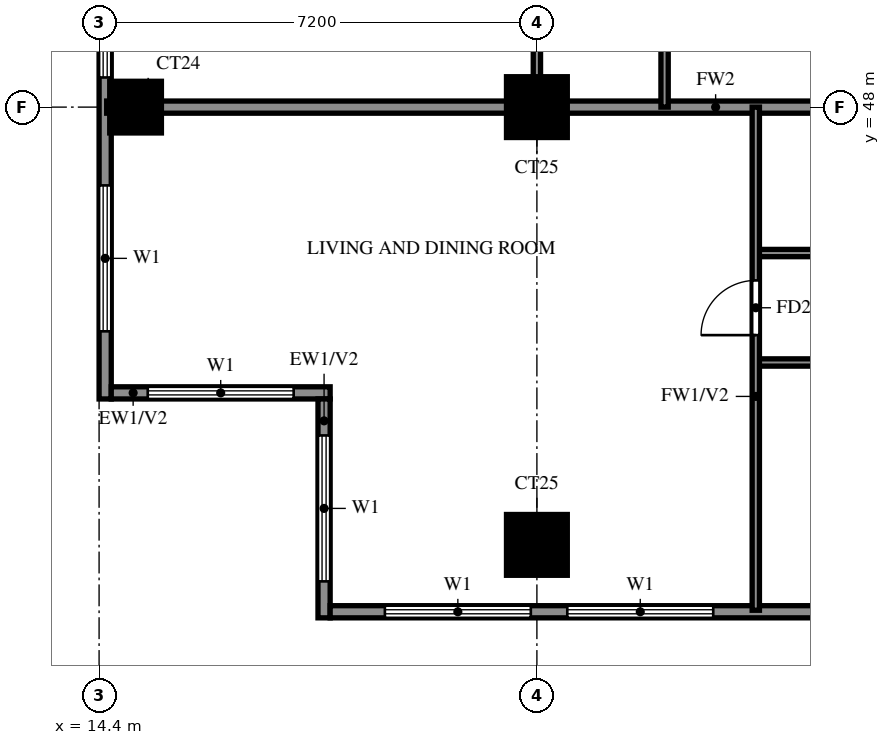
"""IFC4 building model, lengths in metres.
Left out: names, types, materials, properties, quantities, classifications, styles, units other than length and angle.
Written with IfcOpenShell. Run it as: python <this file> out.ifc"""

import sys

from ifc_helpers import new_model, si_unit, direction, frame, frame_2d, origin, origin_2d, place, context, subcontext, project, spatial, rectangle, extrude, source, transform, mapped, element, fill, save


model = new_model("IFC4")
c1 = context("Model", 3, precision=1e-05, world=origin(), true_north=direction((0.0, 1.0)))
c2 = subcontext(c1, "Body", "Model", "MODEL_VIEW")
j1 = project(units=[si_unit("LENGTHUNIT", "METRE"), si_unit("PLANEANGLEUNIT", "RADIAN")], contexts=[c1])
p1 = place(None, origin())
s1 = spatial("IfcSite", under=j1, at=p1, CompositionType="ELEMENT")
p2 = place(p1, origin())
s2 = spatial("IfcBuilding", under=s1, at=p2, CompositionType="ELEMENT")
p3 = place(p2, frame((0.0, 0.0, 150.0)))
s3 = spatial("IfcBuildingStorey", under=s2, at=p3, CompositionType="ELEMENT", Elevation=150.0)
m1 = source(origin(), c2, "Body", "SweptSolid", [
    extrude(rectangle(XDim=1.0, YDim=1.0, at=origin_2d()), origin(), (0.0, 0.0, 1.0), 3.2),
])
p4 = place(p3, frame((21.6, 40.8, 0.0), z_axis=(0.0, 0.0, 1.0), x_axis=(1.0, 0.0, 0.0)))
e1 = element("IfcColumn", 1, at=p4, inside=s3, PredefinedType="COLUMN", context=c2, shape_type="MappedRepresentation", body=[
    mapped(m1, transform((0.0, 0.0, 0.0))),
])
m2 = source(origin(), c2, "Body", "SweptSolid", [
    extrude(rectangle(XDim=0.85, YDim=0.85, at=origin_2d()), origin(), (0.0, 0.0, 1.0), 3.2),
])
p5 = place(p3, frame((15.0, 48.0, 0.0), z_axis=(0.0, 0.0, 1.0), x_axis=(1.0, 0.0, 0.0)))
e2 = element("IfcColumn", 2, at=p5, inside=s3, PredefinedType="COLUMN", context=c2, shape_type="MappedRepresentation", body=[
    mapped(m2, transform((0.0, 0.0, 0.0))),
])
p6 = place(p3, frame((21.6, 48.0, 0.0), z_axis=(0.0, 0.0, 1.0), x_axis=(1.0, 0.0, 0.0)))
e3 = element("IfcColumn", 3, at=p6, inside=s3, PredefinedType="COLUMN", context=c2, shape_type="MappedRepresentation", body=[
    mapped(m1, transform((0.0, 0.0, 0.0))),
])
p7 = place(p3, frame((14.5, 76.6, 0.0), z_axis=(0.0, 0.0, 1.0), x_axis=(0.0, -1.0, 0.0)))
e4 = element("IfcWall", 4, at=p7, inside=s3, PredefinedType="SOLIDWALL", context=c2, shape_type="SweptSolid", body=[
    extrude(rectangle(XDim=33.4, YDim=0.2, at=frame_2d((16.7, 0.0))), origin(), (0.0, 0.0, 1.0), 3.2),
])
p8 = place(p7, frame((7.9, 0.0, 0.0)))
e5 = element("IfcOpeningElement", 5, at=p8, cuts=e4, PredefinedType="OPENING", context=c2, shape_type="SweptSolid", body=[
    extrude(rectangle(XDim=1.8, YDim=2.4, at=frame_2d((0.9, 1.2))), frame((0.0, 0.11, 0.0), z_axis=(0.0, -1.0, 0.0), x_axis=(1.0, 0.0, 0.0)), (0.0, 0.0, 1.0), 0.22),
])
p9 = place(p7, frame((22.3, 0.0, 0.0)))
e6 = element("IfcOpeningElement", 6, at=p9, cuts=e4, PredefinedType="OPENING", context=c2, shape_type="SweptSolid", body=[
    extrude(rectangle(XDim=1.8, YDim=2.4, at=frame_2d((0.9, 1.2))), frame((0.0, 0.11, 0.0), z_axis=(0.0, -1.0, 0.0), x_axis=(1.0, 0.0, 0.0)), (0.0, 0.0, 1.0), 0.22),
])
p10 = place(p7, frame((29.887, 0.0, 0.6)))
e7 = element("IfcOpeningElement", 7, at=p10, cuts=e4, PredefinedType="OPENING", context=c2, shape_type="SweptSolid", body=[
    extrude(rectangle(XDim=2.4, YDim=2.4, at=frame_2d((1.2, 1.2))), frame((0.0, 0.11, 0.0), z_axis=(0.0, -1.0, 0.0), x_axis=(1.0, 0.0, 0.0)), (0.0, 0.0, 1.0), 0.22),
])
p11 = place(p7, frame((24.55, 0.0, 0.6)))
e8 = element("IfcOpeningElement", 8, at=p11, cuts=e4, PredefinedType="OPENING", context=c2, shape_type="SweptSolid", body=[
    extrude(rectangle(XDim=0.9, YDim=2.4, at=frame_2d((0.45, 1.2))), frame((0.0, 0.11, 0.0), z_axis=(0.0, -1.0, 0.0), x_axis=(1.0, 0.0, 0.0)), (0.0, 0.0, 1.0), 0.22),
])
p12 = place(p7, frame((26.312, 0.0, 0.6)))
e9 = element("IfcOpeningElement", 9, at=p12, cuts=e4, PredefinedType="OPENING", context=c2, shape_type="SweptSolid", body=[
    extrude(rectangle(XDim=1.8, YDim=2.4, at=frame_2d((0.9, 1.2))), frame((0.0, 0.11, 0.0), z_axis=(0.0, -1.0, 0.0), x_axis=(1.0, 0.0, 0.0)), (0.0, 0.0, 1.0), 0.22),
])
p13 = place(p7, frame((14.988, 0.0, 0.6)))
e10 = element("IfcOpeningElement", 10, at=p13, cuts=e4, PredefinedType="OPENING", context=c2, shape_type="SweptSolid", body=[
    extrude(rectangle(XDim=2.4, YDim=2.4, at=frame_2d((1.2, 1.2))), frame((0.0, 0.11, 0.0), z_axis=(0.0, -1.0, 0.0), x_axis=(1.0, 0.0, 0.0)), (0.0, 0.0, 1.0), 0.22),
])
p14 = place(p7, frame((17.95, 0.0, 1.5)))
e11 = element("IfcOpeningElement", 11, at=p14, cuts=e4, PredefinedType="OPENING", context=c2, shape_type="SweptSolid", body=[
    extrude(rectangle(XDim=0.9, YDim=0.9, at=frame_2d((0.45, 0.45))), frame((0.0, 0.11, 0.0), z_axis=(0.0, -1.0, 0.0), x_axis=(1.0, 0.0, 0.0)), (0.0, 0.0, 1.0), 0.22),
])
p15 = place(p7, frame((19.863, 0.0, 1.5)))
e12 = element("IfcOpeningElement", 12, at=p15, cuts=e4, PredefinedType="OPENING", context=c2, shape_type="SweptSolid", body=[
    extrude(rectangle(XDim=0.9, YDim=0.9, at=frame_2d((0.45, 0.45))), frame((0.0, 0.11, 0.0), z_axis=(0.0, -1.0, 0.0), x_axis=(1.0, 0.0, 0.0)), (0.0, 0.0, 1.0), 0.22),
])
p16 = place(p7, frame((11.913, 0.0, 0.6)))
e13 = element("IfcOpeningElement", 13, at=p16, cuts=e4, PredefinedType="OPENING", context=c2, shape_type="SweptSolid", body=[
    extrude(rectangle(XDim=1.8, YDim=2.4, at=frame_2d((0.9, 1.2))), frame((0.0, 0.11, 0.0), z_axis=(0.0, -1.0, 0.0), x_axis=(1.0, 0.0, 0.0)), (0.0, 0.0, 1.0), 0.22),
])
p17 = place(p7, frame((3.55, 0.0, 1.5)))
e14 = element("IfcOpeningElement", 14, at=p17, cuts=e4, PredefinedType="OPENING", context=c2, shape_type="SweptSolid", body=[
    extrude(rectangle(XDim=0.9, YDim=0.9, at=frame_2d((0.45, 0.45))), frame((0.0, 0.11, 0.0), z_axis=(0.0, -1.0, 0.0), x_axis=(1.0, 0.0, 0.0)), (0.0, 0.0, 1.0), 0.22),
])
p18 = place(p7, frame((5.462, 0.0, 1.5)))
e15 = element("IfcOpeningElement", 15, at=p18, cuts=e4, PredefinedType="OPENING", context=c2, shape_type="SweptSolid", body=[
    extrude(rectangle(XDim=0.9, YDim=0.9, at=frame_2d((0.45, 0.45))), frame((0.0, 0.11, 0.0), z_axis=(0.0, -1.0, 0.0), x_axis=(1.0, 0.0, 0.0)), (0.0, 0.0, 1.0), 0.22),
])
p19 = place(p7, frame((0.6, 0.0, 0.6)))
e16 = element("IfcOpeningElement", 16, at=p19, cuts=e4, PredefinedType="OPENING", context=c2, shape_type="SweptSolid", body=[
    extrude(rectangle(XDim=2.4, YDim=2.4, at=frame_2d((1.2, 1.2))), frame((0.0, 0.11, 0.0), z_axis=(0.0, -1.0, 0.0), x_axis=(1.0, 0.0, 0.0)), (0.0, 0.0, 1.0), 0.22),
])
p20 = place(p3, frame((14.6, 43.3, 0.0), z_axis=(0.0, 0.0, 1.0), x_axis=(1.0, 0.0, 0.0)))
e17 = element("IfcWall", 17, at=p20, inside=s3, PredefinedType="SOLIDWALL", context=c2, shape_type="SweptSolid", body=[
    extrude(rectangle(XDim=3.6, YDim=0.2, at=frame_2d((1.8, 0.0))), origin(), (0.0, 0.0, 1.0), 3.2),
])
p21 = place(p20, frame((0.6, 0.0, 0.6)))
e18 = element("IfcOpeningElement", 18, at=p21, cuts=e17, PredefinedType="OPENING", context=c2, shape_type="SweptSolid", body=[
    extrude(rectangle(XDim=2.4, YDim=2.4, at=frame_2d((1.2, 1.2))), frame((0.0, 0.11, 0.0), z_axis=(0.0, -1.0, 0.0), x_axis=(1.0, 0.0, 0.0)), (0.0, 0.0, 1.0), 0.22),
])
p22 = place(p3, frame((18.1, 43.2, 0.0), z_axis=(0.0, 0.0, 1.0), x_axis=(0.0, -1.0, 0.0)))
e19 = element("IfcWall", 19, at=p22, inside=s3, PredefinedType="SOLIDWALL", context=c2, shape_type="SweptSolid", body=[
    extrude(rectangle(XDim=3.6, YDim=0.2, at=frame_2d((1.8, 0.0))), origin(), (0.0, 0.0, 1.0), 3.2),
])
p23 = place(p22, frame((0.6, 0.0, 0.6)))
e20 = element("IfcOpeningElement", 20, at=p23, cuts=e19, PredefinedType="OPENING", context=c2, shape_type="SweptSolid", body=[
    extrude(rectangle(XDim=2.4, YDim=2.4, at=frame_2d((1.2, 1.2))), frame((0.0, 0.11, 0.0), z_axis=(0.0, -1.0, 0.0), x_axis=(1.0, 0.0, 0.0)), (0.0, 0.0, 1.0), 0.22),
])
p24 = place(p3, frame((18.2, 39.7, 0.0), z_axis=(0.0, 0.0, 1.0), x_axis=(1.0, 0.0, 0.0)))
e21 = element("IfcWall", 21, at=p24, inside=s3, PredefinedType="SOLIDWALL", context=c2, shape_type="SweptSolid", body=[
    extrude(rectangle(XDim=23.8, YDim=0.2, at=frame_2d((11.9, 0.0))), origin(), (0.0, 0.0, 1.0), 3.2),
])
p25 = place(p24, frame((13.3, 0.0, 0.0)))
e22 = element("IfcOpeningElement", 22, at=p25, cuts=e21, PredefinedType="OPENING", context=c2, shape_type="SweptSolid", body=[
    extrude(rectangle(XDim=1.8, YDim=2.4, at=frame_2d((0.9, 1.2))), frame((0.0, 0.11, 0.0), z_axis=(0.0, -1.0, 0.0), x_axis=(1.0, 0.0, 0.0)), (0.0, 0.0, 1.0), 0.22),
])
p26 = place(p24, frame((0.9, 0.0, 0.6)))
e23 = element("IfcOpeningElement", 23, at=p26, cuts=e21, PredefinedType="OPENING", context=c2, shape_type="SweptSolid", body=[
    extrude(rectangle(XDim=2.4, YDim=2.4, at=frame_2d((1.2, 1.2))), frame((0.0, 0.11, 0.0), z_axis=(0.0, -1.0, 0.0), x_axis=(1.0, 0.0, 0.0)), (0.0, 0.0, 1.0), 0.22),
])
p27 = place(p24, frame((3.9, 0.0, 0.6)))
e24 = element("IfcOpeningElement", 24, at=p27, cuts=e21, PredefinedType="OPENING", context=c2, shape_type="SweptSolid", body=[
    extrude(rectangle(XDim=2.4, YDim=2.4, at=frame_2d((1.2, 1.2))), frame((0.0, 0.11, 0.0), z_axis=(0.0, -1.0, 0.0), x_axis=(1.0, 0.0, 0.0)), (0.0, 0.0, 1.0), 0.22),
])
p28 = place(p24, frame((8.35, 0.0, 1.5)))
e25 = element("IfcOpeningElement", 25, at=p28, cuts=e21, PredefinedType="OPENING", context=c2, shape_type="SweptSolid", body=[
    extrude(rectangle(XDim=0.9, YDim=0.9, at=frame_2d((0.45, 0.45))), frame((0.0, 0.11, 0.0), z_axis=(0.0, -1.0, 0.0), x_axis=(1.0, 0.0, 0.0)), (0.0, 0.0, 1.0), 0.22),
])
p29 = place(p24, frame((11.5, 0.0, 0.6)))
e26 = element("IfcOpeningElement", 26, at=p29, cuts=e21, PredefinedType="OPENING", context=c2, shape_type="SweptSolid", body=[
    extrude(rectangle(XDim=1.2, YDim=2.4, at=frame_2d((0.6, 1.2))), frame((0.0, 0.11, 0.0), z_axis=(0.0, -1.0, 0.0), x_axis=(1.0, 0.0, 0.0)), (0.0, 0.0, 1.0), 0.22),
])
p30 = place(p3, frame((14.525, 48.0, 0.0), z_axis=(0.0, 0.0, 1.0), x_axis=(1.0, 0.0, 0.0)))
e27 = element("IfcWall", 27, at=p30, inside=s3, PredefinedType="SOLIDWALL", context=c2, shape_type="SweptSolid", body=[
    extrude(rectangle(XDim=19.075, YDim=0.2, at=frame_2d((9.538, 0.0))), origin(), (0.0, 0.0, 1.0), 3.2),
])
p31 = place(p3, frame((25.2, 43.8, 0.0), z_axis=(0.0, 0.0, 1.0), x_axis=(1.0, 0.0, 0.0)))
e28 = element("IfcWall", 28, at=p31, inside=s3, PredefinedType="PARTITIONING", context=c2, shape_type="SweptSolid", body=[
    extrude(rectangle(XDim=8.4, YDim=0.12, at=frame_2d((4.2, 0.0))), origin(), (0.0, 0.0, 1.0), 3.2),
])
p32 = place(p31, frame((1.35, 0.0, 0.0)))
e29 = element("IfcOpeningElement", 29, at=p32, cuts=e28, PredefinedType="OPENING", context=c2, shape_type="SweptSolid", body=[
    extrude(rectangle(XDim=0.9, YDim=2.1, at=frame_2d((0.45, 1.05))), frame((0.0, 0.07, 0.0), z_axis=(0.0, -1.0, 0.0), x_axis=(1.0, 0.0, 0.0)), (0.0, 0.0, 1.0), 0.14),
])
p33 = place(p31, frame((5.55, 0.0, 0.0)))
e30 = element("IfcOpeningElement", 30, at=p33, cuts=e28, PredefinedType="OPENING", context=c2, shape_type="SweptSolid", body=[
    extrude(rectangle(XDim=0.9, YDim=2.1, at=frame_2d((0.45, 1.05))), frame((0.0, 0.07, 0.0), z_axis=(0.0, -1.0, 0.0), x_axis=(1.0, 0.0, 0.0)), (0.0, 0.0, 1.0), 0.14),
])
p34 = place(p3, frame((25.2, 45.6, 0.0), z_axis=(0.0, 0.0, 1.0), x_axis=(1.0, 0.0, 0.0)))
e31 = element("IfcWall", 31, at=p34, inside=s3, PredefinedType="PARTITIONING", context=c2, shape_type="SweptSolid", body=[
    extrude(rectangle(XDim=6.0, YDim=0.12, at=frame_2d((3.0, 0.0))), origin(), (0.0, 0.0, 1.0), 3.2),
])
p35 = place(p34, frame((2.55, 0.0, 0.0)))
e32 = element("IfcOpeningElement", 32, at=p35, cuts=e31, PredefinedType="OPENING", context=c2, shape_type="SweptSolid", body=[
    extrude(rectangle(XDim=0.9, YDim=2.1, at=frame_2d((0.45, 1.05))), frame((0.0, 0.07, 0.0), z_axis=(0.0, -1.0, 0.0), x_axis=(1.0, 0.0, 0.0)), (0.0, 0.0, 1.0), 0.14),
])
p36 = place(p3, frame((21.6, 48.0, 0.0), z_axis=(0.0, 0.0, 1.0), x_axis=(0.0, 1.0, 0.0)))
e33 = element("IfcWall", 33, at=p36, inside=s3, PredefinedType="PARTITIONING", context=c2, shape_type="SweptSolid", body=[
    extrude(rectangle(XDim=7.2, YDim=0.12, at=frame_2d((3.6, 0.0))), origin(), (0.0, 0.0, 1.0), 3.2),
])
p37 = place(p36, frame((2.85, 0.0, 0.0)))
e34 = element("IfcOpeningElement", 34, at=p37, cuts=e33, PredefinedType="OPENING", context=c2, shape_type="SweptSolid", body=[
    extrude(rectangle(XDim=1.5, YDim=2.1, at=frame_2d((0.75, 1.05))), frame((0.0, 0.07, 0.0), z_axis=(0.0, -1.0, 0.0), x_axis=(1.0, 0.0, 0.0)), (0.0, 0.0, 1.0), 0.14),
])
p38 = place(p3, frame((23.7, 48.0, 0.0), z_axis=(0.0, 0.0, 1.0), x_axis=(0.0, 1.0, 0.0)))
e35 = element("IfcWall", 35, at=p38, inside=s3, PredefinedType="PARTITIONING", context=c2, shape_type="SweptSolid", body=[
    extrude(rectangle(XDim=3.6, YDim=0.12, at=frame_2d((1.8, 0.0))), origin(), (0.0, 0.0, 1.0), 3.2),
])
p39 = place(p3, frame((25.2, 39.725, 0.0), z_axis=(0.0, 0.0, 1.0), x_axis=(0.0, 1.0, 0.0)))
e36 = element("IfcWall", 36, at=p39, inside=s3, PredefinedType="PARTITIONING", context=c2, shape_type="SweptSolid", body=[
    extrude(rectangle(XDim=8.275, YDim=0.12, at=frame_2d((4.137, 0.0))), origin(), (0.0, 0.0, 1.0), 3.2),
])
p40 = place(p39, frame((4.525, 0.0, 0.0)))
e37 = element("IfcOpeningElement", 37, at=p40, cuts=e36, PredefinedType="OPENING", context=c2, shape_type="SweptSolid", body=[
    extrude(rectangle(XDim=0.9, YDim=2.1, at=frame_2d((0.45, 1.05))), frame((0.0, 0.07, 0.0), z_axis=(0.0, -1.0, 0.0), x_axis=(1.0, 0.0, 0.0)), (0.0, 0.0, 1.0), 0.14),
])
p41 = place(p10, origin())
e38 = element("IfcWindow", 38, at=p41, inside=s3, PartitioningType="DOUBLE_PANEL_VERTICAL", PredefinedType="WINDOW", context=c2, shape_type="SweptSolid", body=[
    extrude(rectangle(XDim=2.4, YDim=2.4, at=frame_2d((1.2, 1.2))), frame((0.0, 0.03, 0.0), z_axis=(0.0, -1.0, 0.0), x_axis=(1.0, 0.0, 0.0)), (0.0, 0.0, 1.0), 0.06),
])
fill(e7, e38)
p42 = place(p12, origin())
e39 = element("IfcWindow", 39, at=p42, inside=s3, PartitioningType="DOUBLE_PANEL_VERTICAL", PredefinedType="WINDOW", context=c2, shape_type="SweptSolid", body=[
    extrude(rectangle(XDim=1.8, YDim=2.4, at=frame_2d((0.9, 1.2))), frame((0.0, 0.03, 0.0), z_axis=(0.0, -1.0, 0.0), x_axis=(1.0, 0.0, 0.0)), (0.0, 0.0, 1.0), 0.06),
])
fill(e9, e39)
p43 = place(p21, origin())
e40 = element("IfcWindow", 40, at=p43, inside=s3, PartitioningType="DOUBLE_PANEL_VERTICAL", PredefinedType="WINDOW", context=c2, shape_type="SweptSolid", body=[
    extrude(rectangle(XDim=2.4, YDim=2.4, at=frame_2d((1.2, 1.2))), frame((0.0, 0.03, 0.0), z_axis=(0.0, -1.0, 0.0), x_axis=(1.0, 0.0, 0.0)), (0.0, 0.0, 1.0), 0.06),
])
fill(e18, e40)
p44 = place(p23, origin())
e41 = element("IfcWindow", 41, at=p44, inside=s3, PartitioningType="DOUBLE_PANEL_VERTICAL", PredefinedType="WINDOW", context=c2, shape_type="SweptSolid", body=[
    extrude(rectangle(XDim=2.4, YDim=2.4, at=frame_2d((1.2, 1.2))), frame((0.0, 0.03, 0.0), z_axis=(0.0, -1.0, 0.0), x_axis=(1.0, 0.0, 0.0)), (0.0, 0.0, 1.0), 0.06),
])
fill(e20, e41)
p45 = place(p26, origin())
e42 = element("IfcWindow", 42, at=p45, inside=s3, PartitioningType="DOUBLE_PANEL_VERTICAL", PredefinedType="WINDOW", context=c2, shape_type="SweptSolid", body=[
    extrude(rectangle(XDim=2.4, YDim=2.4, at=frame_2d((1.2, 1.2))), frame((0.0, 0.03, 0.0), z_axis=(0.0, -1.0, 0.0), x_axis=(1.0, 0.0, 0.0)), (0.0, 0.0, 1.0), 0.06),
])
fill(e23, e42)
p46 = place(p27, origin())
e43 = element("IfcWindow", 43, at=p46, inside=s3, PartitioningType="DOUBLE_PANEL_VERTICAL", PredefinedType="WINDOW", context=c2, shape_type="SweptSolid", body=[
    extrude(rectangle(XDim=2.4, YDim=2.4, at=frame_2d((1.2, 1.2))), frame((0.0, 0.03, 0.0), z_axis=(0.0, -1.0, 0.0), x_axis=(1.0, 0.0, 0.0)), (0.0, 0.0, 1.0), 0.06),
])
fill(e24, e43)
p47 = place(p40, origin())
e44 = element("IfcDoor", 44, at=p47, inside=s3, OperationType="SINGLE_SWING_LEFT", PredefinedType="DOOR", context=c2, shape_type="SweptSolid", body=[
    extrude(rectangle(XDim=0.9, YDim=2.1, at=frame_2d((0.45, 1.05))), frame((0.0, 0.025, 0.0), z_axis=(0.0, -1.0, 0.0), x_axis=(1.0, 0.0, 0.0)), (0.0, 0.0, 1.0), 0.05),
])
fill(e37, e44)
save(model, sys.argv[1])
